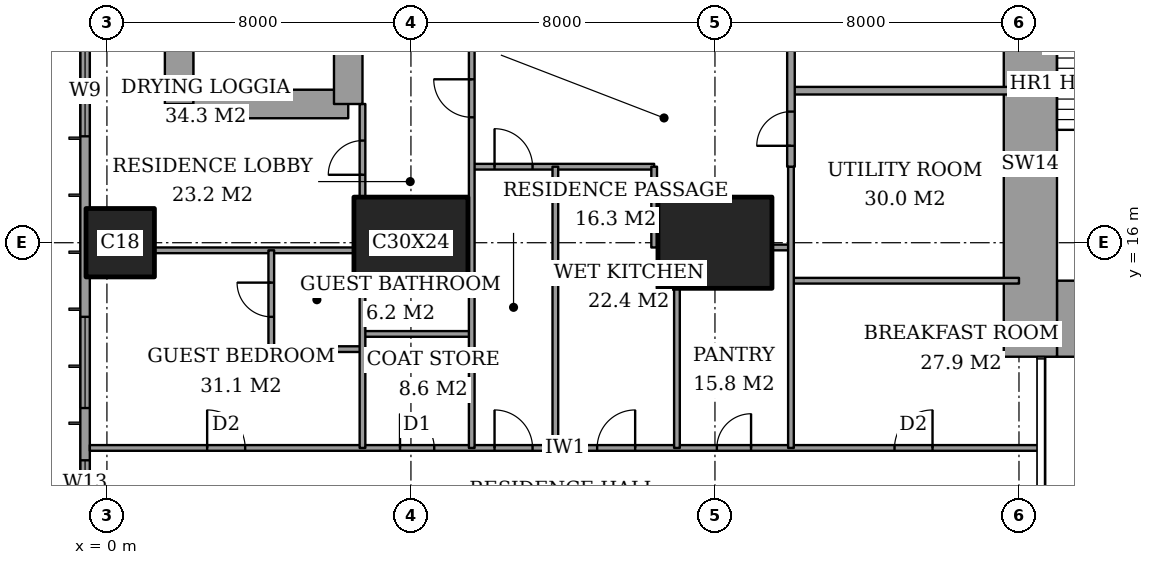
"""IFC4 building model, lengths in metres.
Left out: names, types, materials, properties, quantities, classifications, styles, units other than length and angle.
Written with IfcOpenShell. Run it as: python <this file> out.ifc"""

import sys

from ifc_helpers import new_model, si_unit, direction, frame, frame_2d, origin, origin_2d, place, context, subcontext, project, spatial, rectangle, extrude, element, fill, save


model = new_model("IFC4")
c1 = context("Model", 3, precision=1e-05, world=origin(), true_north=direction((0.0, 1.0)))
c2 = subcontext(c1, "Body", "Model", "MODEL_VIEW")
j1 = project(units=[si_unit("LENGTHUNIT", "METRE"), si_unit("PLANEANGLEUNIT", "RADIAN")], contexts=[c1])
p1 = place(None, origin())
s1 = spatial("IfcSite", under=j1, at=p1, CompositionType="ELEMENT")
p2 = place(p1, origin())
s2 = spatial("IfcBuilding", under=s1, at=p2, CompositionType="ELEMENT")
p3 = place(p2, frame((0.0, 0.0, 193.0)))
s3 = spatial("IfcBuildingStorey", under=s2, at=p3, CompositionType="ELEMENT", Elevation=193.0)
p4 = place(p3, frame((0.35, 16.0, 0.0), z_axis=(0.0, 0.0, 1.0), x_axis=(1.0, 0.0, 0.0)))
e1 = element("IfcColumn", 1, at=p4, inside=s3, PredefinedType="COLUMN", context=c2, shape_type="SweptSolid", body=[
    extrude(rectangle(XDim=1.8, YDim=1.8, at=origin_2d()), origin(), (0.0, 0.0, 1.0), 3.6),
])
for number, where, z_axis, x_axis in (
    (2, (8.0, 16.0, 0.0), (0.0, 0.0, 1.0), (1.0, 0.0, 0.0)),
    (3, (16.0, 16.0, 0.0), (0.0, 0.0, 1.0), (1.0, 0.0, 0.0)),
):
    element("IfcColumn", number, at=place(p3, frame(where, z_axis=z_axis, x_axis=x_axis)), inside=s3, PredefinedType="COLUMN", context=c2, shape_type="SweptSolid", body=[
        extrude(rectangle(XDim=3.0, YDim=2.4, at=origin_2d()), origin(), (0.0, 0.0, 1.0), 3.6),
    ])
p5 = place(p3, frame((25.0, 14.0, 0.0), z_axis=(0.0, 0.0, 1.0), x_axis=(1.0, 0.0, 0.0)))
e4 = element("IfcWall", 4, at=p5, inside=s3, PredefinedType="SHEAR", context=c2, shape_type="SweptSolid", body=[
    extrude(rectangle(XDim=3.15, YDim=2.0, at=frame_2d((1.575, 0.0))), origin(), (0.0, 0.0, 1.0), 3.6),
])
p6 = place(p3, frame((24.3, 13.0, 0.0), z_axis=(0.0, 0.0, 1.0), x_axis=(0.0, 1.0, 0.0)))
e5 = element("IfcWall", 5, at=p6, inside=s3, PredefinedType="SHEAR", context=c2, shape_type="SweptSolid", body=[
    extrude(rectangle(XDim=10.15, YDim=1.4, at=frame_2d((5.075, 0.0))), origin(), (0.0, 0.0, 1.0), 3.6),
])
p7 = place(p3, frame((1.9, 19.65, 0.0), z_axis=(0.0, 0.0, 1.0), x_axis=(1.0, 0.0, 0.0)))
e6 = element("IfcWall", 6, at=p7, inside=s3, PredefinedType="SHEAR", context=c2, shape_type="SweptSolid", body=[
    extrude(rectangle(XDim=4.45, YDim=0.75, at=frame_2d((2.225, 0.0))), origin(), (0.0, 0.0, 1.0), 3.6),
])
p8 = place(p3, frame((6.35, 19.65, 0.0), z_axis=(0.0, 0.0, 1.0), x_axis=(0.0, 1.0, 0.0)))
e7 = element("IfcWall", 7, at=p8, inside=s3, PredefinedType="SHEAR", context=c2, shape_type="SweptSolid", body=[
    extrude(rectangle(XDim=8.7, YDim=0.75, at=frame_2d((4.35, 0.0))), origin(), (0.0, 0.0, 1.0), 3.6),
])
p9 = place(p8, frame((6.725, 0.0, 0.0)))
e8 = element("IfcOpeningElement", 8, at=p9, cuts=e7, PredefinedType="OPENING", context=c2, shape_type="SweptSolid", body=[
    extrude(rectangle(XDim=1.0, YDim=2.1, at=frame_2d((0.5, 1.05))), frame((0.0, 0.385, 0.0), z_axis=(0.0, -1.0, 0.0), x_axis=(1.0, 0.0, 0.0)), (0.0, 0.0, 1.0), 0.77),
])
p10 = place(p3, frame((1.9, 28.35, 0.0), z_axis=(0.0, 0.0, 1.0), x_axis=(0.0, -1.0, 0.0)))
e9 = element("IfcWall", 9, at=p10, inside=s3, PredefinedType="SHEAR", context=c2, shape_type="SweptSolid", body=[
    extrude(rectangle(XDim=8.7, YDim=0.75, at=frame_2d((4.35, 0.0))), origin(), (0.0, 0.0, 1.0), 3.6),
])
p11 = place(p3, frame((-0.575, 44.825, 0.0), z_axis=(0.0, 0.0, 1.0), x_axis=(0.0, -1.0, 0.0)))
e10 = element("IfcWall", 10, at=p11, inside=s3, PredefinedType="SOLIDWALL", context=c2, shape_type="SweptSolid", body=[
    extrude(rectangle(XDim=41.65, YDim=0.25, at=frame_2d((20.825, 0.0))), origin(), (0.0, 0.0, 1.0), 3.6),
])
p12 = place(p11, frame((0.825, 0.0, 0.2)))
e11 = element("IfcOpeningElement", 11, at=p12, cuts=e10, PredefinedType="OPENING", context=c2, shape_type="SweptSolid", body=[
    extrude(rectangle(XDim=2.4, YDim=2.4, at=frame_2d((1.2, 1.2))), frame((0.0, 0.135, 0.0), z_axis=(0.0, -1.0, 0.0), x_axis=(1.0, 0.0, 0.0)), (0.0, 0.0, 1.0), 0.27),
])
p13 = place(p11, frame((6.05, 0.0, 0.2)))
e12 = element("IfcOpeningElement", 12, at=p13, cuts=e10, PredefinedType="OPENING", context=c2, shape_type="SweptSolid", body=[
    extrude(rectangle(XDim=1.2, YDim=2.4, at=frame_2d((0.6, 1.2))), frame((0.0, 0.135, 0.0), z_axis=(0.0, -1.0, 0.0), x_axis=(1.0, 0.0, 0.0)), (0.0, 0.0, 1.0), 0.27),
])
p14 = place(p11, frame((8.225, 0.0, 0.2)))
e13 = element("IfcOpeningElement", 13, at=p14, cuts=e10, PredefinedType="OPENING", context=c2, shape_type="SweptSolid", body=[
    extrude(rectangle(XDim=2.4, YDim=2.4, at=frame_2d((1.2, 1.2))), frame((0.0, 0.135, 0.0), z_axis=(0.0, -1.0, 0.0), x_axis=(1.0, 0.0, 0.0)), (0.0, 0.0, 1.0), 0.27),
])
p15 = place(p11, frame((15.625, 0.0, 0.2)))
e14 = element("IfcOpeningElement", 14, at=p15, cuts=e10, PredefinedType="OPENING", context=c2, shape_type="SweptSolid", body=[
    extrude(rectangle(XDim=2.4, YDim=2.4, at=frame_2d((1.2, 1.2))), frame((0.0, 0.135, 0.0), z_axis=(0.0, -1.0, 0.0), x_axis=(1.0, 0.0, 0.0)), (0.0, 0.0, 1.0), 0.27),
])
p16 = place(p11, frame((23.625, 0.0, 0.2)))
e15 = element("IfcOpeningElement", 15, at=p16, cuts=e10, PredefinedType="OPENING", context=c2, shape_type="SweptSolid", body=[
    extrude(rectangle(XDim=2.4, YDim=2.4, at=frame_2d((1.2, 1.2))), frame((0.0, 0.135, 0.0), z_axis=(0.0, -1.0, 0.0), x_axis=(1.0, 0.0, 0.0)), (0.0, 0.0, 1.0), 0.27),
])
p17 = place(p11, frame((30.775, 0.0, 0.2)))
e16 = element("IfcOpeningElement", 16, at=p17, cuts=e10, PredefinedType="OPENING", context=c2, shape_type="SweptSolid", body=[
    extrude(rectangle(XDim=2.4, YDim=2.4, at=frame_2d((1.2, 1.2))), frame((0.0, 0.135, 0.0), z_axis=(0.0, -1.0, 0.0), x_axis=(1.0, 0.0, 0.0)), (0.0, 0.0, 1.0), 0.27),
])
p18 = place(p11, frame((34.55, 0.0, 0.2)))
e17 = element("IfcOpeningElement", 17, at=p18, cuts=e10, PredefinedType="OPENING", context=c2, shape_type="SweptSolid", body=[
    extrude(rectangle(XDim=1.2, YDim=2.4, at=frame_2d((0.6, 1.2))), frame((0.0, 0.135, 0.0), z_axis=(0.0, -1.0, 0.0), x_axis=(1.0, 0.0, 0.0)), (0.0, 0.0, 1.0), 0.27),
])
p19 = place(p11, frame((38.425, 0.0, 0.2)))
e18 = element("IfcOpeningElement", 18, at=p19, cuts=e10, PredefinedType="OPENING", context=c2, shape_type="SweptSolid", body=[
    extrude(rectangle(XDim=2.4, YDim=2.4, at=frame_2d((1.2, 1.2))), frame((0.0, 0.135, 0.0), z_axis=(0.0, -1.0, 0.0), x_axis=(1.0, 0.0, 0.0)), (0.0, 0.0, 1.0), 0.27),
])
p20 = place(p3, frame((-0.45, 10.6, 0.0), z_axis=(0.0, 0.0, 1.0), x_axis=(1.0, 0.0, 0.0)))
e19 = element("IfcWall", 19, at=p20, inside=s3, PredefinedType="PARTITIONING", context=c2, shape_type="SweptSolid", body=[
    extrude(rectangle(XDim=25.011, YDim=0.15, at=frame_2d((12.505, 0.0))), origin(), (0.0, 0.0, 1.0), 3.35),
])
p21 = place(p20, frame((10.65, 0.0, 0.0)))
e20 = element("IfcOpeningElement", 20, at=p21, cuts=e19, PredefinedType="OPENING", context=c2, shape_type="SweptSolid", body=[
    extrude(rectangle(XDim=1.0, YDim=2.1, at=frame_2d((0.5, 1.05))), frame((0.0, 0.085, 0.0), z_axis=(0.0, -1.0, 0.0), x_axis=(1.0, 0.0, 0.0)), (0.0, 0.0, 1.0), 0.17),
])
p22 = place(p20, frame((3.087, 0.0, 0.0)))
e21 = element("IfcOpeningElement", 21, at=p22, cuts=e19, PredefinedType="OPENING", context=c2, shape_type="SweptSolid", body=[
    extrude(rectangle(XDim=1.0, YDim=2.1, at=frame_2d((0.5, 1.05))), frame((0.0, 0.085, 0.0), z_axis=(0.0, -1.0, 0.0), x_axis=(1.0, 0.0, 0.0)), (0.0, 0.0, 1.0), 0.17),
])
p23 = place(p20, frame((8.163, 0.0, 0.0)))
e22 = element("IfcOpeningElement", 22, at=p23, cuts=e19, PredefinedType="OPENING", context=c2, shape_type="SweptSolid", body=[
    extrude(rectangle(XDim=0.9, YDim=2.1, at=frame_2d((0.45, 1.05))), frame((0.0, 0.085, 0.0), z_axis=(0.0, -1.0, 0.0), x_axis=(1.0, 0.0, 0.0)), (0.0, 0.0, 1.0), 0.17),
])
p24 = place(p20, frame((13.35, 0.0, 0.0)))
e23 = element("IfcOpeningElement", 23, at=p24, cuts=e19, PredefinedType="OPENING", context=c2, shape_type="SweptSolid", body=[
    extrude(rectangle(XDim=1.0, YDim=2.1, at=frame_2d((0.5, 1.05))), frame((0.0, 0.085, 0.0), z_axis=(0.0, -1.0, 0.0), x_axis=(1.0, 0.0, 0.0)), (0.0, 0.0, 1.0), 0.17),
])
p25 = place(p20, frame((16.5, 0.0, 0.0)))
e24 = element("IfcOpeningElement", 24, at=p25, cuts=e19, PredefinedType="OPENING", context=c2, shape_type="SweptSolid", body=[
    extrude(rectangle(XDim=0.9, YDim=2.1, at=frame_2d((0.45, 1.05))), frame((0.0, 0.085, 0.0), z_axis=(0.0, -1.0, 0.0), x_axis=(1.0, 0.0, 0.0)), (0.0, 0.0, 1.0), 0.17),
])
p26 = place(p20, frame((21.175, 0.0, 0.0)))
e25 = element("IfcOpeningElement", 25, at=p26, cuts=e19, PredefinedType="OPENING", context=c2, shape_type="SweptSolid", body=[
    extrude(rectangle(XDim=1.0, YDim=2.1, at=frame_2d((0.5, 1.05))), frame((0.0, 0.085, 0.0), z_axis=(0.0, -1.0, 0.0), x_axis=(1.0, 0.0, 0.0)), (0.0, 0.0, 1.0), 0.17),
])
p27 = place(p3, frame((4.325, 13.2, 0.0), z_axis=(0.0, 0.0, 1.0), x_axis=(1.0, 0.0, 0.0)))
e26 = element("IfcWall", 26, at=p27, inside=s3, PredefinedType="PARTITIONING", context=c2, shape_type="SweptSolid", body=[
    extrude(rectangle(XDim=2.4, YDim=0.15, at=frame_2d((1.2, 0.0))), origin(), (0.0, 0.0, 1.0), 3.35),
])
p28 = place(p3, frame((6.725, 13.6, 0.0), z_axis=(0.0, 0.0, 1.0), x_axis=(1.0, 0.0, 0.0)))
e27 = element("IfcWall", 27, at=p28, inside=s3, PredefinedType="PARTITIONING", context=c2, shape_type="SweptSolid", body=[
    extrude(rectangle(XDim=2.875, YDim=0.15, at=frame_2d((1.438, 0.0))), origin(), (0.0, 0.0, 1.0), 3.35),
])
p29 = place(p3, frame((18.0, 15.0, 0.0), z_axis=(0.0, 0.0, 1.0), x_axis=(1.0, 0.0, 0.0)))
e28 = element("IfcWall", 28, at=p29, inside=s3, PredefinedType="PARTITIONING", context=c2, shape_type="SweptSolid", body=[
    extrude(rectangle(XDim=6.0, YDim=0.15, at=frame_2d((3.0, 0.0))), origin(), (0.0, 0.0, 1.0), 3.35),
])
p30 = place(p3, frame((1.25, 15.8, 0.0), z_axis=(0.0, 0.0, 1.0), x_axis=(1.0, 0.0, 0.0)))
e29 = element("IfcWall", 29, at=p30, inside=s3, PredefinedType="PARTITIONING", context=c2, shape_type="SweptSolid", body=[
    extrude(rectangle(XDim=5.25, YDim=0.15, at=frame_2d((2.625, 0.0))), origin(), (0.0, 0.0, 1.0), 3.35),
])
p31 = place(p3, frame((17.5, 15.875, 0.0), z_axis=(0.0, 0.0, 1.0), x_axis=(1.0, 0.0, 0.0)))
e30 = element("IfcWall", 30, at=p31, inside=s3, PredefinedType="PARTITIONING", context=c2, shape_type="SweptSolid", body=[
    extrude(rectangle(XDim=0.5, YDim=0.15, at=frame_2d((0.25, 0.0))), origin(), (0.0, 0.0, 1.0), 2.634),
])
p32 = place(p3, frame((9.6, 18.0, 0.0), z_axis=(0.0, 0.0, 1.0), x_axis=(1.0, 0.0, 0.0)))
e31 = element("IfcWall", 31, at=p32, inside=s3, PredefinedType="PARTITIONING", context=c2, shape_type="SweptSolid", body=[
    extrude(rectangle(XDim=4.8, YDim=0.15, at=frame_2d((2.4, 0.0))), origin(), (0.0, 0.0, 1.0), 3.35),
])
p33 = place(p32, frame((0.6, 0.0, 0.0)))
e32 = element("IfcOpeningElement", 32, at=p33, cuts=e31, PredefinedType="OPENING", context=c2, shape_type="SweptSolid", body=[
    extrude(rectangle(XDim=1.0, YDim=2.1, at=frame_2d((0.5, 1.05))), frame((0.0, 0.085, 0.0), z_axis=(0.0, -1.0, 0.0), x_axis=(1.0, 0.0, 0.0)), (0.0, 0.0, 1.0), 0.17),
])
p34 = place(p3, frame((18.0, 20.0, 0.0), z_axis=(0.0, 0.0, 1.0), x_axis=(1.0, 0.0, 0.0)))
e33 = element("IfcWall", 33, at=p34, inside=s3, PredefinedType="PARTITIONING", context=c2, shape_type="SweptSolid", body=[
    extrude(rectangle(XDim=6.0, YDim=0.2, at=frame_2d((3.0, 0.0))), origin(), (0.0, 0.0, 1.0), 3.35),
])
p35 = place(p3, frame((4.325, 13.2, 0.0), z_axis=(0.0, 0.0, 1.0), x_axis=(0.0, 1.0, 0.0)))
e34 = element("IfcWall", 34, at=p35, inside=s3, PredefinedType="PARTITIONING", context=c2, shape_type="SweptSolid", body=[
    extrude(rectangle(XDim=2.6, YDim=0.15, at=frame_2d((1.3, 0.0))), origin(), (0.0, 0.0, 1.0), 3.35),
])
p36 = place(p35, frame((0.85, 0.0, 0.0)))
e35 = element("IfcOpeningElement", 35, at=p36, cuts=e34, PredefinedType="OPENING", context=c2, shape_type="SweptSolid", body=[
    extrude(rectangle(XDim=0.9, YDim=2.1, at=frame_2d((0.45, 1.05))), frame((0.0, 0.085, 0.0), z_axis=(0.0, -1.0, 0.0), x_axis=(1.0, 0.0, 0.0)), (0.0, 0.0, 1.0), 0.17),
])
p37 = place(p3, frame((6.725, 10.6, 0.0), z_axis=(0.0, 0.0, 1.0), x_axis=(0.0, 1.0, 0.0)))
e36 = element("IfcWall", 36, at=p37, inside=s3, PredefinedType="PARTITIONING", context=c2, shape_type="SweptSolid", body=[
    extrude(rectangle(XDim=4.2, YDim=0.15, at=frame_2d((2.1, 0.0))), origin(), (0.0, 0.0, 1.0), 3.35),
])
p38 = place(p3, frame((6.725, 17.2, 0.0), z_axis=(0.0, 0.0, 1.0), x_axis=(0.0, 1.0, 0.0)))
e37 = element("IfcWall", 37, at=p38, inside=s3, PredefinedType="PARTITIONING", context=c2, shape_type="SweptSolid", body=[
    extrude(rectangle(XDim=2.45, YDim=0.15, at=frame_2d((1.225, 0.0))), origin(), (0.0, 0.0, 1.0), 3.35),
])
p39 = place(p38, frame((0.587, 0.0, 0.0)))
e38 = element("IfcOpeningElement", 38, at=p39, cuts=e37, PredefinedType="OPENING", context=c2, shape_type="SweptSolid", body=[
    extrude(rectangle(XDim=0.9, YDim=2.1, at=frame_2d((0.45, 1.05))), frame((0.0, 0.085, 0.0), z_axis=(0.0, -1.0, 0.0), x_axis=(1.0, 0.0, 0.0)), (0.0, 0.0, 1.0), 0.17),
])
p40 = place(p3, frame((9.6, 10.6, 0.0), z_axis=(0.0, 0.0, 1.0), x_axis=(0.0, 1.0, 0.0)))
e39 = element("IfcWall", 39, at=p40, inside=s3, PredefinedType="PARTITIONING", context=c2, shape_type="SweptSolid", body=[
    extrude(rectangle(XDim=11.0, YDim=0.15, at=frame_2d((5.5, 0.0))), origin(), (0.0, 0.0, 1.0), 3.35),
])
p41 = place(p40, frame((8.7, 0.0, 0.0)))
e40 = element("IfcOpeningElement", 40, at=p41, cuts=e39, PredefinedType="OPENING", context=c2, shape_type="SweptSolid", body=[
    extrude(rectangle(XDim=1.0, YDim=2.1, at=frame_2d((0.5, 1.05))), frame((0.0, 0.085, 0.0), z_axis=(0.0, -1.0, 0.0), x_axis=(1.0, 0.0, 0.0)), (0.0, 0.0, 1.0), 0.17),
])
p42 = place(p3, frame((11.8, 10.6, 0.0), z_axis=(0.0, 0.0, 1.0), x_axis=(0.0, 1.0, 0.0)))
e41 = element("IfcWall", 41, at=p42, inside=s3, PredefinedType="PARTITIONING", context=c2, shape_type="SweptSolid", body=[
    extrude(rectangle(XDim=7.4, YDim=0.15, at=frame_2d((3.7, 0.0))), origin(), (0.0, 0.0, 1.0), 3.35),
])
p43 = place(p3, frame((14.4, 15.875, 0.0), z_axis=(0.0, 0.0, 1.0), x_axis=(0.0, 1.0, 0.0)))
e42 = element("IfcWall", 42, at=p43, inside=s3, PredefinedType="PARTITIONING", context=c2, shape_type="SweptSolid", body=[
    extrude(rectangle(XDim=2.125, YDim=0.15, at=frame_2d((1.062, 0.0))), origin(), (0.0, 0.0, 1.0), 3.35),
])
p44 = place(p3, frame((15.0, 10.6, 0.0), z_axis=(0.0, 0.0, 1.0), x_axis=(0.0, 1.0, 0.0)))
e43 = element("IfcWall", 43, at=p44, inside=s3, PredefinedType="PARTITIONING", context=c2, shape_type="SweptSolid", body=[
    extrude(rectangle(XDim=4.2, YDim=0.15, at=frame_2d((2.1, 0.0))), origin(), (0.0, 0.0, 1.0), 3.35),
])
p45 = place(p3, frame((18.0, 18.0, 0.0), z_axis=(0.0, 0.0, 1.0), x_axis=(0.0, 1.0, 0.0)))
e44 = element("IfcWall", 44, at=p45, inside=s3, PredefinedType="PARTITIONING", context=c2, shape_type="SweptSolid", body=[
    extrude(rectangle(XDim=6.0, YDim=0.2, at=frame_2d((3.0, 0.0))), origin(), (0.0, 0.0, 1.0), 3.35),
])
p46 = place(p45, frame((3.4, 0.0, 0.0)))
e45 = element("IfcOpeningElement", 45, at=p46, cuts=e44, PredefinedType="OPENING", context=c2, shape_type="SweptSolid", body=[
    extrude(rectangle(XDim=1.2, YDim=2.4, at=frame_2d((0.6, 1.2))), frame((0.0, 0.11, 0.0), z_axis=(0.0, -1.0, 0.0), x_axis=(1.0, 0.0, 0.0)), (0.0, 0.0, 1.0), 0.22),
])
p47 = place(p45, frame((0.55, 0.0, 0.0)))
e46 = element("IfcOpeningElement", 46, at=p47, cuts=e44, PredefinedType="OPENING", context=c2, shape_type="SweptSolid", body=[
    extrude(rectangle(XDim=0.9, YDim=2.1, at=frame_2d((0.45, 1.05))), frame((0.0, 0.11, 0.0), z_axis=(0.0, -1.0, 0.0), x_axis=(1.0, 0.0, 0.0)), (0.0, 0.0, 1.0), 0.22),
])
p48 = place(p3, frame((18.0, 10.6, 0.0), z_axis=(0.0, 0.0, 1.0), x_axis=(0.0, 1.0, 0.0)))
e47 = element("IfcWall", 47, at=p48, inside=s3, PredefinedType="PARTITIONING", context=c2, shape_type="SweptSolid", body=[
    extrude(rectangle(XDim=7.4, YDim=0.15, at=frame_2d((3.7, 0.0))), origin(), (0.0, 0.0, 1.0), 3.35),
])
p49 = place(p16, origin())
e48 = element("IfcWindow", 48, at=p49, inside=s3, PartitioningType="SINGLE_PANEL", PredefinedType="WINDOW", context=c2, shape_type="SweptSolid", body=[
    extrude(rectangle(XDim=2.4, YDim=2.4, at=frame_2d((1.2, 1.2))), frame((0.0, 0.03, 0.0), z_axis=(0.0, -1.0, 0.0), x_axis=(1.0, 0.0, 0.0)), (0.0, 0.0, 1.0), 0.06),
])
fill(e15, e48)
p50 = place(p17, origin())
e49 = element("IfcWindow", 49, at=p50, inside=s3, PartitioningType="SINGLE_PANEL", PredefinedType="WINDOW", context=c2, shape_type="SweptSolid", body=[
    extrude(rectangle(XDim=2.4, YDim=2.4, at=frame_2d((1.2, 1.2))), frame((0.0, 0.03, 0.0), z_axis=(0.0, -1.0, 0.0), x_axis=(1.0, 0.0, 0.0)), (0.0, 0.0, 1.0), 0.06),
])
fill(e16, e49)
p51 = place(p18, origin())
e50 = element("IfcWindow", 50, at=p51, inside=s3, PartitioningType="SINGLE_PANEL", PredefinedType="WINDOW", context=c2, shape_type="SweptSolid", body=[
    extrude(rectangle(XDim=1.2, YDim=2.4, at=frame_2d((0.6, 1.2))), frame((0.0, 0.03, 0.0), z_axis=(0.0, -1.0, 0.0), x_axis=(1.0, 0.0, 0.0)), (0.0, 0.0, 1.0), 0.06),
])
fill(e17, e50)
p52 = place(p21, origin())
e51 = element("IfcDoor", 51, at=p52, inside=s3, OperationType="SINGLE_SWING_RIGHT", PredefinedType="DOOR", context=c2, shape_type="SweptSolid", body=[
    extrude(rectangle(XDim=1.0, YDim=2.1, at=frame_2d((0.5, 1.05))), frame((0.0, 0.025, 0.0), z_axis=(0.0, -1.0, 0.0), x_axis=(1.0, 0.0, 0.0)), (0.0, 0.0, 1.0), 0.05),
])
fill(e20, e51)
p53 = place(p36, origin())
e52 = element("IfcDoor", 52, at=p53, inside=s3, OperationType="SINGLE_SWING_LEFT", PredefinedType="DOOR", context=c2, shape_type="SweptSolid", body=[
    extrude(rectangle(XDim=0.9, YDim=2.1, at=frame_2d((0.45, 1.05))), frame((0.0, 0.025, 0.0), z_axis=(0.0, -1.0, 0.0), x_axis=(1.0, 0.0, 0.0)), (0.0, 0.0, 1.0), 0.05),
])
fill(e35, e52)
p54 = place(p22, origin())
e53 = element("IfcDoor", 53, at=p54, inside=s3, OperationType="SINGLE_SWING_RIGHT", PredefinedType="DOOR", context=c2, shape_type="SweptSolid", body=[
    extrude(rectangle(XDim=1.0, YDim=2.1, at=frame_2d((0.5, 1.05))), frame((0.0, 0.025, 0.0), z_axis=(0.0, -1.0, 0.0), x_axis=(1.0, 0.0, 0.0)), (0.0, 0.0, 1.0), 0.05),
])
fill(e21, e53)
p55 = place(p39, origin())
e54 = element("IfcDoor", 54, at=p55, inside=s3, OperationType="SINGLE_SWING_RIGHT", PredefinedType="DOOR", context=c2, shape_type="SweptSolid", body=[
    extrude(rectangle(XDim=0.9, YDim=2.1, at=frame_2d((0.45, 1.05))), frame((0.0, 0.025, 0.0), z_axis=(0.0, -1.0, 0.0), x_axis=(1.0, 0.0, 0.0)), (0.0, 0.0, 1.0), 0.05),
])
fill(e38, e54)
p56 = place(p23, origin())
e55 = element("IfcDoor", 55, at=p56, inside=s3, OperationType="SINGLE_SWING_RIGHT", PredefinedType="DOOR", context=c2, shape_type="SweptSolid", body=[
    extrude(rectangle(XDim=0.9, YDim=2.1, at=frame_2d((0.45, 1.05))), frame((0.0, 0.025, 0.0), z_axis=(0.0, -1.0, 0.0), x_axis=(1.0, 0.0, 0.0)), (0.0, 0.0, 1.0), 0.05),
])
fill(e22, e55)
p57 = place(p41, origin())
e56 = element("IfcDoor", 56, at=p57, inside=s3, OperationType="SINGLE_SWING_LEFT", PredefinedType="DOOR", context=c2, shape_type="SweptSolid", body=[
    extrude(rectangle(XDim=1.0, YDim=2.1, at=frame_2d((0.5, 1.05))), frame((0.0, 0.025, 0.0), z_axis=(0.0, -1.0, 0.0), x_axis=(1.0, 0.0, 0.0)), (0.0, 0.0, 1.0), 0.05),
])
fill(e40, e56)
p58 = place(p33, origin())
e57 = element("IfcDoor", 57, at=p58, inside=s3, OperationType="SINGLE_SWING_RIGHT", PredefinedType="DOOR", context=c2, shape_type="SweptSolid", body=[
    extrude(rectangle(XDim=1.0, YDim=2.1, at=frame_2d((0.5, 1.05))), frame((0.0, 0.025, 0.0), z_axis=(0.0, -1.0, 0.0), x_axis=(1.0, 0.0, 0.0)), (0.0, 0.0, 1.0), 0.05),
])
fill(e32, e57)
p59 = place(p24, origin())
e58 = element("IfcDoor", 58, at=p59, inside=s3, OperationType="SINGLE_SWING_LEFT", PredefinedType="DOOR", context=c2, shape_type="SweptSolid", body=[
    extrude(rectangle(XDim=1.0, YDim=2.1, at=frame_2d((0.5, 1.05))), frame((0.0, 0.025, 0.0), z_axis=(0.0, -1.0, 0.0), x_axis=(1.0, 0.0, 0.0)), (0.0, 0.0, 1.0), 0.05),
])
fill(e23, e58)
p60 = place(p25, origin())
e59 = element("IfcDoor", 59, at=p60, inside=s3, OperationType="SINGLE_SWING_LEFT", PredefinedType="DOOR", context=c2, shape_type="SweptSolid", body=[
    extrude(rectangle(XDim=0.9, YDim=2.1, at=frame_2d((0.45, 1.05))), frame((0.0, 0.025, 0.0), z_axis=(0.0, -1.0, 0.0), x_axis=(1.0, 0.0, 0.0)), (0.0, 0.0, 1.0), 0.05),
])
fill(e24, e59)
p61 = place(p26, origin())
e60 = element("IfcDoor", 60, at=p61, inside=s3, OperationType="SINGLE_SWING_LEFT", PredefinedType="DOOR", context=c2, shape_type="SweptSolid", body=[
    extrude(rectangle(XDim=1.0, YDim=2.1, at=frame_2d((0.5, 1.05))), frame((0.0, 0.025, 0.0), z_axis=(0.0, -1.0, 0.0), x_axis=(1.0, 0.0, 0.0)), (0.0, 0.0, 1.0), 0.05),
])
fill(e25, e60)
p62 = place(p47, origin())
e61 = element("IfcDoor", 61, at=p62, inside=s3, OperationType="SINGLE_SWING_RIGHT", PredefinedType="DOOR", context=c2, shape_type="SweptSolid", body=[
    extrude(rectangle(XDim=0.9, YDim=2.1, at=frame_2d((0.45, 1.05))), frame((0.0, 0.025, 0.0), z_axis=(0.0, -1.0, 0.0), x_axis=(1.0, 0.0, 0.0)), (0.0, 0.0, 1.0), 0.05),
])
fill(e46, e61)
save(model, sys.argv[1])
